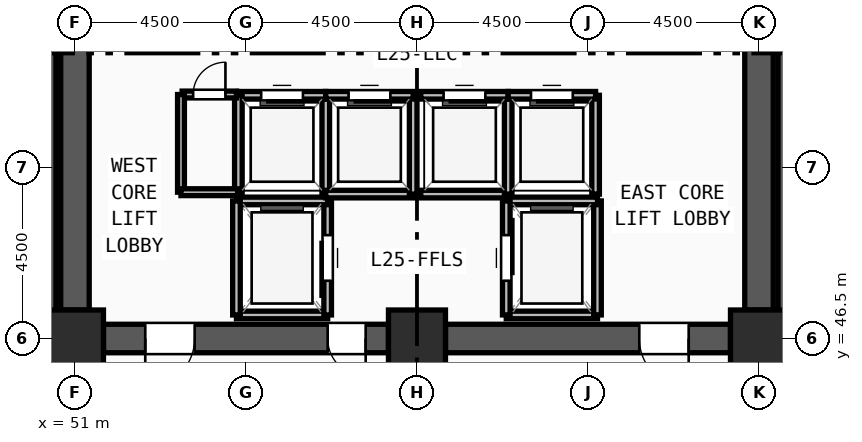
"""IFC4 building model, lengths in metres.
Left out: names, types, materials, properties, quantities, classifications, styles, units other than length and angle.
Written with IfcOpenShell. Run it as: python <this file> out.ifc"""

import sys

from ifc_helpers import new_model, si_unit, direction, frame, frame_2d, origin, origin_2d, place, context, subcontext, project, spatial, rectangle, extrude, source, transform, mapped, element, fill, save


model = new_model("IFC4")
c1 = context("Model", 3, precision=1e-05, world=origin(), true_north=direction((0.0, 1.0)))
c2 = subcontext(c1, "Body", "Model", "MODEL_VIEW")
j1 = project(units=[si_unit("LENGTHUNIT", "METRE"), si_unit("PLANEANGLEUNIT", "RADIAN")], contexts=[c1])
p1 = place(None, origin())
s1 = spatial("IfcSite", under=j1, at=p1, CompositionType="ELEMENT")
p2 = place(p1, origin())
s2 = spatial("IfcBuilding", under=s1, at=p2, CompositionType="ELEMENT")
p3 = place(p2, frame((0.0, 0.0, 97.5)))
s3 = spatial("IfcBuildingStorey", under=s2, at=p3, CompositionType="ELEMENT", Elevation=97.5)
m1 = source(origin(), c2, "Body", "SweptSolid", [
    extrude(rectangle(XDim=1.5, YDim=1.5, at=origin_2d()), origin(), (0.0, 0.0, 1.0), 4.5),
])
for number, where, z_axis, x_axis in (
    (1, (51.0, 46.5, 0.0), (0.0, 0.0, 1.0), (1.0, 0.0, 0.0)),
    (2, (60.0, 46.5, 0.0), (0.0, 0.0, 1.0), (1.0, 0.0, 0.0)),
    (3, (69.0, 46.5, 0.0), (0.0, 0.0, 1.0), (1.0, 0.0, 0.0)),
):
    element("IfcColumn", number, at=place(p3, frame(where, z_axis=z_axis, x_axis=x_axis)), inside=s3, PredefinedType="COLUMN", context=c2, shape_type="MappedRepresentation", body=[
        mapped(m1, transform((0.0, 0.0, 0.0), x_axis=(1.0, 0.0, 0.0), y_axis=(0.0, 1.0, 0.0), z_axis=(0.0, 0.0, 1.0), scale=1.0)),
    ])
p4 = place(p3, frame((69.0, 60.75, 0.0), z_axis=(0.0, 0.0, 1.0), x_axis=(0.0, -1.0, 0.0)))
e4 = element("IfcWall", 4, at=p4, inside=s3, PredefinedType="SHEAR", context=c2, shape_type="SweptSolid", body=[
    extrude(rectangle(XDim=13.5, YDim=0.75, at=frame_2d((6.75, 0.0))), origin(), (0.0, 0.0, 1.0), 4.32),
])
m2 = source(origin(), c2, "Body", "SweptSolid", [
    extrude(rectangle(XDim=1.2, YDim=2.2, at=frame_2d((0.6, 1.1))), frame((0.0, 0.385, 0.0), z_axis=(0.0, -1.0, 0.0), x_axis=(1.0, 0.0, 0.0)), (0.0, 0.0, 1.0), 0.77),
])
p5 = place(p4, frame((1.2, 0.0, 0.0)))
e5 = element("IfcOpeningElement", 5, at=p5, cuts=e4, PredefinedType="OPENING", context=c2, shape_type="MappedRepresentation", body=[
    mapped(m2, transform((0.0, 0.0, 0.0), x_axis=(1.0, 0.0, 0.0), y_axis=(0.0, 1.0, 0.0), z_axis=(0.0, 0.0, 1.0), scale=1.0)),
])
p6 = place(p3, frame((68.25, 46.5, 0.0), z_axis=(0.0, 0.0, 1.0), x_axis=(-1.0, 0.0, 0.0)))
e6 = element("IfcWall", 6, at=p6, inside=s3, PredefinedType="SHEAR", context=c2, shape_type="SweptSolid", body=[
    extrude(rectangle(XDim=7.5, YDim=0.75, at=frame_2d((3.75, 0.0))), origin(), (0.0, 0.0, 1.0), 4.32),
])
m3 = source(origin(), c2, "Body", "SweptSolid", [
    extrude(rectangle(XDim=1.3, YDim=2.2, at=frame_2d((0.65, 1.1))), frame((0.0, 0.385, 0.0), z_axis=(0.0, -1.0, 0.0), x_axis=(1.0, 0.0, 0.0)), (0.0, 0.0, 1.0), 0.77),
])
p7 = place(p6, frame((1.1, 0.0, 0.0)))
e7 = element("IfcOpeningElement", 7, at=p7, cuts=e6, PredefinedType="OPENING", context=c2, shape_type="MappedRepresentation", body=[
    mapped(m3, transform((0.0, 0.0, 0.0), x_axis=(1.0, 0.0, 0.0), y_axis=(0.0, 1.0, 0.0), z_axis=(0.0, 0.0, 1.0), scale=1.0)),
])
p8 = place(p3, frame((59.25, 46.5, 0.0), z_axis=(0.0, 0.0, 1.0), x_axis=(-1.0, 0.0, 0.0)))
e8 = element("IfcWall", 8, at=p8, inside=s3, PredefinedType="SHEAR", context=c2, shape_type="SweptSolid", body=[
    extrude(rectangle(XDim=7.5, YDim=0.75, at=frame_2d((3.75, 0.0))), origin(), (0.0, 0.0, 1.0), 4.32),
])
p9 = place(p8, frame((5.1, 0.0, 0.0)))
e9 = element("IfcOpeningElement", 9, at=p9, cuts=e8, PredefinedType="OPENING", context=c2, shape_type="MappedRepresentation", body=[
    mapped(m3, transform((0.0, 0.0, 0.0), x_axis=(1.0, 0.0, 0.0), y_axis=(0.0, 1.0, 0.0), z_axis=(0.0, 0.0, 1.0), scale=1.0)),
])
m4 = source(origin(), c2, "Body", "SweptSolid", [
    extrude(rectangle(XDim=1.0, YDim=2.2, at=frame_2d((0.5, 1.1))), frame((0.0, 0.385, 0.0), z_axis=(0.0, -1.0, 0.0), x_axis=(1.0, 0.0, 0.0)), (0.0, 0.0, 1.0), 0.77),
])
p10 = place(p8, frame((0.6, 0.0, 0.0)))
e10 = element("IfcOpeningElement", 10, at=p10, cuts=e8, PredefinedType="OPENING", context=c2, shape_type="MappedRepresentation", body=[
    mapped(m4, transform((0.0, 0.0, 0.0), x_axis=(1.0, 0.0, 0.0), y_axis=(0.0, 1.0, 0.0), z_axis=(0.0, 0.0, 1.0), scale=1.0)),
])
p11 = place(p3, frame((51.0, 47.25, 0.0), z_axis=(0.0, 0.0, 1.0), x_axis=(0.0, 1.0, 0.0)))
e11 = element("IfcWall", 11, at=p11, inside=s3, PredefinedType="SHEAR", context=c2, shape_type="SweptSolid", body=[
    extrude(rectangle(XDim=13.5, YDim=0.75, at=frame_2d((6.75, 0.0))), origin(), (0.0, 0.0, 1.0), 4.32),
])
m5 = source(origin(), c2, "Body", "SweptSolid", [
    extrude(rectangle(XDim=1.1, YDim=2.2, at=frame_2d((0.55, 1.1))), frame((0.0, 0.385, 0.0), z_axis=(0.0, -1.0, 0.0), x_axis=(1.0, 0.0, 0.0)), (0.0, 0.0, 1.0), 0.77),
])
p12 = place(p11, frame((11.65, 0.0, 0.0)))
e12 = element("IfcOpeningElement", 12, at=p12, cuts=e11, PredefinedType="OPENING", context=c2, shape_type="MappedRepresentation", body=[
    mapped(m5, transform((0.0, 0.0, 0.0), x_axis=(1.0, 0.0, 0.0), y_axis=(0.0, 1.0, 0.0), z_axis=(0.0, 0.0, 1.0), scale=1.0)),
])
for number, where, z_axis, x_axis in (
    (13, (50.38, 46.7, 0.0), (0.0, 0.0, 1.0), (0.0, 1.0, 0.0)),
    (14, (69.62, 54.52, 0.0), (0.0, 0.0, 1.0), (0.0, -1.0, 0.0)),
):
    element("IfcWall", number, at=place(p3, frame(where, z_axis=z_axis, x_axis=x_axis)), inside=s3, PredefinedType="SOLIDWALL", context=c2, shape_type="SweptSolid", body=[
        extrude(rectangle(XDim=7.82, YDim=0.24, at=frame_2d((3.91, 0.0))), origin(), (0.0, 0.0, 1.0), 4.32),
    ])
p13 = place(p3, frame((55.25, 47.12, 0.0), z_axis=(0.0, 0.0, 1.0), x_axis=(1.0, 0.0, 0.0)))
e15 = element("IfcWall", 15, at=p13, inside=s3, PredefinedType="SOLIDWALL", context=c2, shape_type="SweptSolid", body=[
    extrude(rectangle(XDim=2.4, YDim=0.2, at=frame_2d((1.2, 0.0))), origin(), (0.0, 0.0, 1.0), 4.32),
])
p14 = place(p3, frame((57.65, 47.12, 0.0), z_axis=(0.0, 0.0, 1.0), x_axis=(0.0, 1.0, 0.0)))
e16 = element("IfcWall", 16, at=p14, inside=s3, PredefinedType="SOLIDWALL", context=c2, shape_type="SweptSolid", body=[
    extrude(rectangle(XDim=3.0, YDim=0.2, at=frame_2d((1.5, 0.0))), origin(), (0.0, 0.0, 1.0), 4.32),
])
m6 = source(origin(), c2, "Body", "SweptSolid", [
    extrude(rectangle(XDim=1.2, YDim=2.3, at=frame_2d((0.6, 1.15))), frame((0.0, 0.11, 0.0), z_axis=(0.0, -1.0, 0.0), x_axis=(1.0, 0.0, 0.0)), (0.0, 0.0, 1.0), 0.22),
])
p15 = place(p14, frame((0.9, 0.0, 0.0)))
e17 = element("IfcOpeningElement", 17, at=p15, cuts=e16, PredefinedType="OPENING", context=c2, shape_type="MappedRepresentation", body=[
    mapped(m6, transform((0.0, 0.0, 0.0), x_axis=(1.0, 0.0, 0.0), y_axis=(0.0, 1.0, 0.0), z_axis=(0.0, 0.0, 1.0), scale=1.0)),
])
p16 = place(p3, frame((57.65, 50.12, 0.0), z_axis=(0.0, 0.0, 1.0), x_axis=(-1.0, 0.0, 0.0)))
e18 = element("IfcWall", 18, at=p16, inside=s3, PredefinedType="SOLIDWALL", context=c2, shape_type="SweptSolid", body=[
    extrude(rectangle(XDim=2.4, YDim=0.2, at=frame_2d((1.2, 0.0))), origin(), (0.0, 0.0, 1.0), 4.32),
])
p17 = place(p3, frame((55.25, 50.12, 0.0), z_axis=(0.0, 0.0, 1.0), x_axis=(0.0, -1.0, 0.0)))
e19 = element("IfcWall", 19, at=p17, inside=s3, PredefinedType="SOLIDWALL", context=c2, shape_type="SweptSolid", body=[
    extrude(rectangle(XDim=3.0, YDim=0.2, at=frame_2d((1.5, 0.0))), origin(), (0.0, 0.0, 1.0), 4.32),
])
p18 = place(p3, frame((62.35, 47.12, 0.0), z_axis=(0.0, 0.0, 1.0), x_axis=(1.0, 0.0, 0.0)))
e20 = element("IfcWall", 20, at=p18, inside=s3, PredefinedType="SOLIDWALL", context=c2, shape_type="SweptSolid", body=[
    extrude(rectangle(XDim=2.4, YDim=0.2, at=frame_2d((1.2, 0.0))), origin(), (0.0, 0.0, 1.0), 4.32),
])
p19 = place(p3, frame((64.75, 47.12, 0.0), z_axis=(0.0, 0.0, 1.0), x_axis=(0.0, 1.0, 0.0)))
e21 = element("IfcWall", 21, at=p19, inside=s3, PredefinedType="SOLIDWALL", context=c2, shape_type="SweptSolid", body=[
    extrude(rectangle(XDim=3.0, YDim=0.2, at=frame_2d((1.5, 0.0))), origin(), (0.0, 0.0, 1.0), 4.32),
])
p20 = place(p3, frame((64.75, 50.12, 0.0), z_axis=(0.0, 0.0, 1.0), x_axis=(-1.0, 0.0, 0.0)))
e22 = element("IfcWall", 22, at=p20, inside=s3, PredefinedType="SOLIDWALL", context=c2, shape_type="SweptSolid", body=[
    extrude(rectangle(XDim=2.4, YDim=0.2, at=frame_2d((1.2, 0.0))), origin(), (0.0, 0.0, 1.0), 4.32),
])
p21 = place(p3, frame((62.35, 50.12, 0.0), z_axis=(0.0, 0.0, 1.0), x_axis=(0.0, -1.0, 0.0)))
e23 = element("IfcWall", 23, at=p21, inside=s3, PredefinedType="SOLIDWALL", context=c2, shape_type="SweptSolid", body=[
    extrude(rectangle(XDim=3.0, YDim=0.2, at=frame_2d((1.5, 0.0))), origin(), (0.0, 0.0, 1.0), 4.32),
])
p22 = place(p21, frame((0.9, 0.0, 0.0)))
e24 = element("IfcOpeningElement", 24, at=p22, cuts=e23, PredefinedType="OPENING", context=c2, shape_type="MappedRepresentation", body=[
    mapped(m6, transform((0.0, 0.0, 0.0), x_axis=(1.0, 0.0, 0.0), y_axis=(0.0, 1.0, 0.0), z_axis=(0.0, 0.0, 1.0), scale=1.0)),
])
p23 = place(p3, frame((57.6, 50.3, 0.0), z_axis=(0.0, 0.0, 1.0), x_axis=(0.0, 1.0, 0.0)))
e25 = element("IfcWall", 25, at=p23, inside=s3, PredefinedType="SOLIDWALL", context=c2, shape_type="SweptSolid", body=[
    extrude(rectangle(XDim=2.6, YDim=0.2, at=frame_2d((1.3, 0.0))), origin(), (0.0, 0.0, 1.0), 4.32),
])
p24 = place(p3, frame((57.6, 52.9, 0.0), z_axis=(0.0, 0.0, 1.0), x_axis=(-1.0, 0.0, 0.0)))
e26 = element("IfcWall", 26, at=p24, inside=s3, PredefinedType="SOLIDWALL", context=c2, shape_type="SweptSolid", body=[
    extrude(rectangle(XDim=2.3, YDim=0.2, at=frame_2d((1.15, 0.0))), origin(), (0.0, 0.0, 1.0), 4.32),
])
m7 = source(origin(), c2, "Body", "SweptSolid", [
    extrude(rectangle(XDim=1.1, YDim=2.2, at=frame_2d((0.55, 1.1))), frame((0.0, 0.11, 0.0), z_axis=(0.0, -1.0, 0.0), x_axis=(1.0, 0.0, 0.0)), (0.0, 0.0, 1.0), 0.22),
])
p25 = place(p24, frame((0.6, 0.0, 0.0)))
e27 = element("IfcOpeningElement", 27, at=p25, cuts=e26, PredefinedType="OPENING", context=c2, shape_type="MappedRepresentation", body=[
    mapped(m7, transform((0.0, 0.0, 0.0), x_axis=(1.0, 0.0, 0.0), y_axis=(0.0, 1.0, 0.0), z_axis=(0.0, 0.0, 1.0), scale=1.0)),
])
p26 = place(p3, frame((55.3, 52.9, 0.0), z_axis=(0.0, 0.0, 1.0), x_axis=(0.0, -1.0, 0.0)))
e28 = element("IfcWall", 28, at=p26, inside=s3, PredefinedType="SOLIDWALL", context=c2, shape_type="SweptSolid", body=[
    extrude(rectangle(XDim=2.6, YDim=0.2, at=frame_2d((1.3, 0.0))), origin(), (0.0, 0.0, 1.0), 4.32),
])
p27 = place(p3, frame((57.6, 50.3, 0.0), z_axis=(0.0, 0.0, 1.0), x_axis=(1.0, 0.0, 0.0)))
e29 = element("IfcWall", 29, at=p27, inside=s3, PredefinedType="SOLIDWALL", context=c2, shape_type="SweptSolid", body=[
    extrude(rectangle(XDim=2.3, YDim=0.2, at=frame_2d((1.15, 0.0))), origin(), (0.0, 0.0, 1.0), 4.32),
])
p28 = place(p3, frame((59.9, 50.3, 0.0), z_axis=(0.0, 0.0, 1.0), x_axis=(0.0, 1.0, 0.0)))
e30 = element("IfcWall", 30, at=p28, inside=s3, PredefinedType="SOLIDWALL", context=c2, shape_type="SweptSolid", body=[
    extrude(rectangle(XDim=2.6, YDim=0.2, at=frame_2d((1.3, 0.0))), origin(), (0.0, 0.0, 1.0), 4.32),
])
p29 = place(p3, frame((59.9, 52.9, 0.0), z_axis=(0.0, 0.0, 1.0), x_axis=(-1.0, 0.0, 0.0)))
e31 = element("IfcWall", 31, at=p29, inside=s3, PredefinedType="SOLIDWALL", context=c2, shape_type="SweptSolid", body=[
    extrude(rectangle(XDim=2.3, YDim=0.2, at=frame_2d((1.15, 0.0))), origin(), (0.0, 0.0, 1.0), 4.32),
])
p30 = place(p29, frame((0.6, 0.0, 0.0)))
e32 = element("IfcOpeningElement", 32, at=p30, cuts=e31, PredefinedType="OPENING", context=c2, shape_type="MappedRepresentation", body=[
    mapped(m7, transform((0.0, 0.0, 0.0), x_axis=(1.0, 0.0, 0.0), y_axis=(0.0, 1.0, 0.0), z_axis=(0.0, 0.0, 1.0), scale=1.0)),
])
p31 = place(p3, frame((60.1, 50.3, 0.0), z_axis=(0.0, 0.0, 1.0), x_axis=(1.0, 0.0, 0.0)))
e33 = element("IfcWall", 33, at=p31, inside=s3, PredefinedType="SOLIDWALL", context=c2, shape_type="SweptSolid", body=[
    extrude(rectangle(XDim=2.3, YDim=0.2, at=frame_2d((1.15, 0.0))), origin(), (0.0, 0.0, 1.0), 4.32),
])
p32 = place(p3, frame((62.4, 50.3, 0.0), z_axis=(0.0, 0.0, 1.0), x_axis=(0.0, 1.0, 0.0)))
e34 = element("IfcWall", 34, at=p32, inside=s3, PredefinedType="SOLIDWALL", context=c2, shape_type="SweptSolid", body=[
    extrude(rectangle(XDim=2.6, YDim=0.2, at=frame_2d((1.3, 0.0))), origin(), (0.0, 0.0, 1.0), 4.32),
])
p33 = place(p3, frame((62.4, 52.9, 0.0), z_axis=(0.0, 0.0, 1.0), x_axis=(-1.0, 0.0, 0.0)))
e35 = element("IfcWall", 35, at=p33, inside=s3, PredefinedType="SOLIDWALL", context=c2, shape_type="SweptSolid", body=[
    extrude(rectangle(XDim=2.3, YDim=0.2, at=frame_2d((1.15, 0.0))), origin(), (0.0, 0.0, 1.0), 4.32),
])
p34 = place(p33, frame((0.6, 0.0, 0.0)))
e36 = element("IfcOpeningElement", 36, at=p34, cuts=e35, PredefinedType="OPENING", context=c2, shape_type="MappedRepresentation", body=[
    mapped(m7, transform((0.0, 0.0, 0.0), x_axis=(1.0, 0.0, 0.0), y_axis=(0.0, 1.0, 0.0), z_axis=(0.0, 0.0, 1.0), scale=1.0)),
])
p35 = place(p3, frame((64.7, 50.3, 0.0), z_axis=(0.0, 0.0, 1.0), x_axis=(0.0, 1.0, 0.0)))
e37 = element("IfcWall", 37, at=p35, inside=s3, PredefinedType="SOLIDWALL", context=c2, shape_type="SweptSolid", body=[
    extrude(rectangle(XDim=2.6, YDim=0.2, at=frame_2d((1.3, 0.0))), origin(), (0.0, 0.0, 1.0), 4.32),
])
p36 = place(p3, frame((64.7, 52.9, 0.0), z_axis=(0.0, 0.0, 1.0), x_axis=(-1.0, 0.0, 0.0)))
e38 = element("IfcWall", 38, at=p36, inside=s3, PredefinedType="SOLIDWALL", context=c2, shape_type="SweptSolid", body=[
    extrude(rectangle(XDim=2.3, YDim=0.2, at=frame_2d((1.15, 0.0))), origin(), (0.0, 0.0, 1.0), 4.32),
])
p37 = place(p36, frame((0.6, 0.0, 0.0)))
e39 = element("IfcOpeningElement", 39, at=p37, cuts=e38, PredefinedType="OPENING", context=c2, shape_type="MappedRepresentation", body=[
    mapped(m7, transform((0.0, 0.0, 0.0), x_axis=(1.0, 0.0, 0.0), y_axis=(0.0, 1.0, 0.0), z_axis=(0.0, 0.0, 1.0), scale=1.0)),
])
p38 = place(p3, frame((53.82, 52.92, 0.0), z_axis=(0.0, 0.0, 1.0), x_axis=(1.0, 0.0, 0.0)))
e40 = element("IfcWall", 40, at=p38, inside=s3, PredefinedType="PARTITIONING", context=c2, shape_type="SweptSolid", body=[
    extrude(rectangle(XDim=1.43, YDim=0.18, at=frame_2d((0.715, 0.0))), origin(), (0.0, 0.0, 1.0), 4.32),
])
m8 = source(origin(), c2, "Body", "SweptSolid", [
    extrude(rectangle(XDim=0.85, YDim=2.1, at=frame_2d((0.425, 1.05))), frame((0.0, 0.1, 0.0), z_axis=(0.0, -1.0, 0.0), x_axis=(1.0, 0.0, 0.0)), (0.0, 0.0, 1.0), 0.2),
])
p39 = place(p38, frame((0.29, 0.0, 0.0)))
e41 = element("IfcOpeningElement", 41, at=p39, cuts=e40, PredefinedType="OPENING", context=c2, shape_type="MappedRepresentation", body=[
    mapped(m8, transform((0.0, 0.0, 0.0), x_axis=(1.0, 0.0, 0.0), y_axis=(0.0, 1.0, 0.0), z_axis=(0.0, 0.0, 1.0), scale=1.0)),
])
p40 = place(p3, frame((53.79, 50.35, 0.0), z_axis=(0.0, 0.0, 1.0), x_axis=(0.0, 1.0, 0.0)))
e42 = element("IfcWall", 42, at=p40, inside=s3, PredefinedType="PARTITIONING", context=c2, shape_type="SweptSolid", body=[
    extrude(rectangle(XDim=2.57, YDim=0.18, at=frame_2d((1.285, 0.0))), origin(), (0.0, 0.0, 1.0), 4.32),
])
p41 = place(p3, frame((53.79, 50.35, 0.0), z_axis=(0.0, 0.0, 1.0), x_axis=(1.0, 0.0, 0.0)))
e43 = element("IfcWall", 43, at=p41, inside=s3, PredefinedType="PARTITIONING", context=c2, shape_type="SweptSolid", body=[
    extrude(rectangle(XDim=1.49, YDim=0.18, at=frame_2d((0.745, 0.0))), origin(), (0.0, 0.0, 1.0), 4.32),
])
m9 = source(origin(), c2, "Body", "SweptSolid", [
    extrude(rectangle(XDim=1.3, YDim=2.2, at=frame_2d((0.65, 1.1))), frame((0.0, 0.025, 0.0), z_axis=(0.0, -1.0, 0.0), x_axis=(1.0, 0.0, 0.0)), (0.0, 0.0, 1.0), 0.05),
])
p42 = place(p9, origin())
e44 = element("IfcDoor", 44, at=p42, inside=s3, OperationType="SINGLE_SWING_RIGHT", PredefinedType="DOOR", context=c2, shape_type="MappedRepresentation", body=[
    mapped(m9, transform((0.0, 0.0, 0.0), x_axis=(1.0, 0.0, 0.0), y_axis=(0.0, 1.0, 0.0), z_axis=(0.0, 0.0, 1.0), scale=1.0)),
])
fill(e9, e44)
m10 = source(origin(), c2, "Body", "SweptSolid", [
    extrude(rectangle(XDim=1.0, YDim=2.2, at=frame_2d((0.5, 1.1))), frame((0.0, 0.025, 0.0), z_axis=(0.0, -1.0, 0.0), x_axis=(1.0, 0.0, 0.0)), (0.0, 0.0, 1.0), 0.05),
])
p43 = place(p10, origin())
e45 = element("IfcDoor", 45, at=p43, inside=s3, OperationType="SINGLE_SWING_LEFT", PredefinedType="DOOR", context=c2, shape_type="MappedRepresentation", body=[
    mapped(m10, transform((0.0, 0.0, 0.0), x_axis=(1.0, 0.0, 0.0), y_axis=(0.0, 1.0, 0.0), z_axis=(0.0, 0.0, 1.0), scale=1.0)),
])
fill(e10, e45)
p44 = place(p7, origin())
e46 = element("IfcDoor", 46, at=p44, inside=s3, OperationType="SINGLE_SWING_LEFT", PredefinedType="DOOR", context=c2, shape_type="MappedRepresentation", body=[
    mapped(m9, transform((0.0, 0.0, 0.0), x_axis=(1.0, 0.0, 0.0), y_axis=(0.0, 1.0, 0.0), z_axis=(0.0, 0.0, 1.0), scale=1.0)),
])
fill(e7, e46)
m11 = source(origin(), c2, "Body", "SweptSolid", [
    extrude(rectangle(XDim=1.2, YDim=2.3, at=frame_2d((0.6, 1.15))), frame((0.0, 0.025, 0.0), z_axis=(0.0, -1.0, 0.0), x_axis=(1.0, 0.0, 0.0)), (0.0, 0.0, 1.0), 0.05),
])
p45 = place(p15, origin())
e47 = element("IfcDoor", 47, at=p45, inside=s3, OperationType="SLIDING_TO_LEFT", PredefinedType="DOOR", context=c2, shape_type="MappedRepresentation", body=[
    mapped(m11, transform((0.0, 0.0, 0.0), x_axis=(1.0, 0.0, 0.0), y_axis=(0.0, 1.0, 0.0), z_axis=(0.0, 0.0, 1.0), scale=1.0)),
])
fill(e17, e47)
p46 = place(p22, origin())
e48 = element("IfcDoor", 48, at=p46, inside=s3, OperationType="SLIDING_TO_LEFT", PredefinedType="DOOR", context=c2, shape_type="MappedRepresentation", body=[
    mapped(m11, transform((0.0, 0.0, 0.0), x_axis=(1.0, 0.0, 0.0), y_axis=(0.0, 1.0, 0.0), z_axis=(0.0, 0.0, 1.0), scale=1.0)),
])
fill(e24, e48)
m12 = source(origin(), c2, "Body", "SweptSolid", [
    extrude(rectangle(XDim=1.1, YDim=2.2, at=frame_2d((0.55, 1.1))), frame((0.0, 0.025, 0.0), z_axis=(0.0, -1.0, 0.0), x_axis=(1.0, 0.0, 0.0)), (0.0, 0.0, 1.0), 0.05),
])
p47 = place(p25, origin())
e49 = element("IfcDoor", 49, at=p47, inside=s3, OperationType="SLIDING_TO_LEFT", PredefinedType="DOOR", context=c2, shape_type="MappedRepresentation", body=[
    mapped(m12, transform((0.0, 0.0, 0.0), x_axis=(1.0, 0.0, 0.0), y_axis=(0.0, 1.0, 0.0), z_axis=(0.0, 0.0, 1.0), scale=1.0)),
])
fill(e27, e49)
p48 = place(p30, origin())
e50 = element("IfcDoor", 50, at=p48, inside=s3, OperationType="SLIDING_TO_LEFT", PredefinedType="DOOR", context=c2, shape_type="MappedRepresentation", body=[
    mapped(m12, transform((0.0, 0.0, 0.0), x_axis=(1.0, 0.0, 0.0), y_axis=(0.0, 1.0, 0.0), z_axis=(0.0, 0.0, 1.0), scale=1.0)),
])
fill(e32, e50)
p49 = place(p34, origin())
e51 = element("IfcDoor", 51, at=p49, inside=s3, OperationType="SLIDING_TO_LEFT", PredefinedType="DOOR", context=c2, shape_type="MappedRepresentation", body=[
    mapped(m12, transform((0.0, 0.0, 0.0), x_axis=(1.0, 0.0, 0.0), y_axis=(0.0, 1.0, 0.0), z_axis=(0.0, 0.0, 1.0), scale=1.0)),
])
fill(e36, e51)
p50 = place(p37, origin())
e52 = element("IfcDoor", 52, at=p50, inside=s3, OperationType="SLIDING_TO_LEFT", PredefinedType="DOOR", context=c2, shape_type="MappedRepresentation", body=[
    mapped(m12, transform((0.0, 0.0, 0.0), x_axis=(1.0, 0.0, 0.0), y_axis=(0.0, 1.0, 0.0), z_axis=(0.0, 0.0, 1.0), scale=1.0)),
])
fill(e39, e52)
m13 = source(origin(), c2, "Body", "SweptSolid", [
    extrude(rectangle(XDim=0.85, YDim=2.1, at=frame_2d((0.425, 1.05))), frame((0.0, 0.025, 0.0), z_axis=(0.0, -1.0, 0.0), x_axis=(1.0, 0.0, 0.0)), (0.0, 0.0, 1.0), 0.05),
])
p51 = place(p39, origin())
e53 = element("IfcDoor", 53, at=p51, inside=s3, OperationType="SINGLE_SWING_RIGHT", PredefinedType="DOOR", context=c2, shape_type="MappedRepresentation", body=[
    mapped(m13, transform((0.0, 0.0, 0.0), x_axis=(1.0, 0.0, 0.0), y_axis=(0.0, 1.0, 0.0), z_axis=(0.0, 0.0, 1.0), scale=1.0)),
])
fill(e41, e53)
save(model, sys.argv[1])
